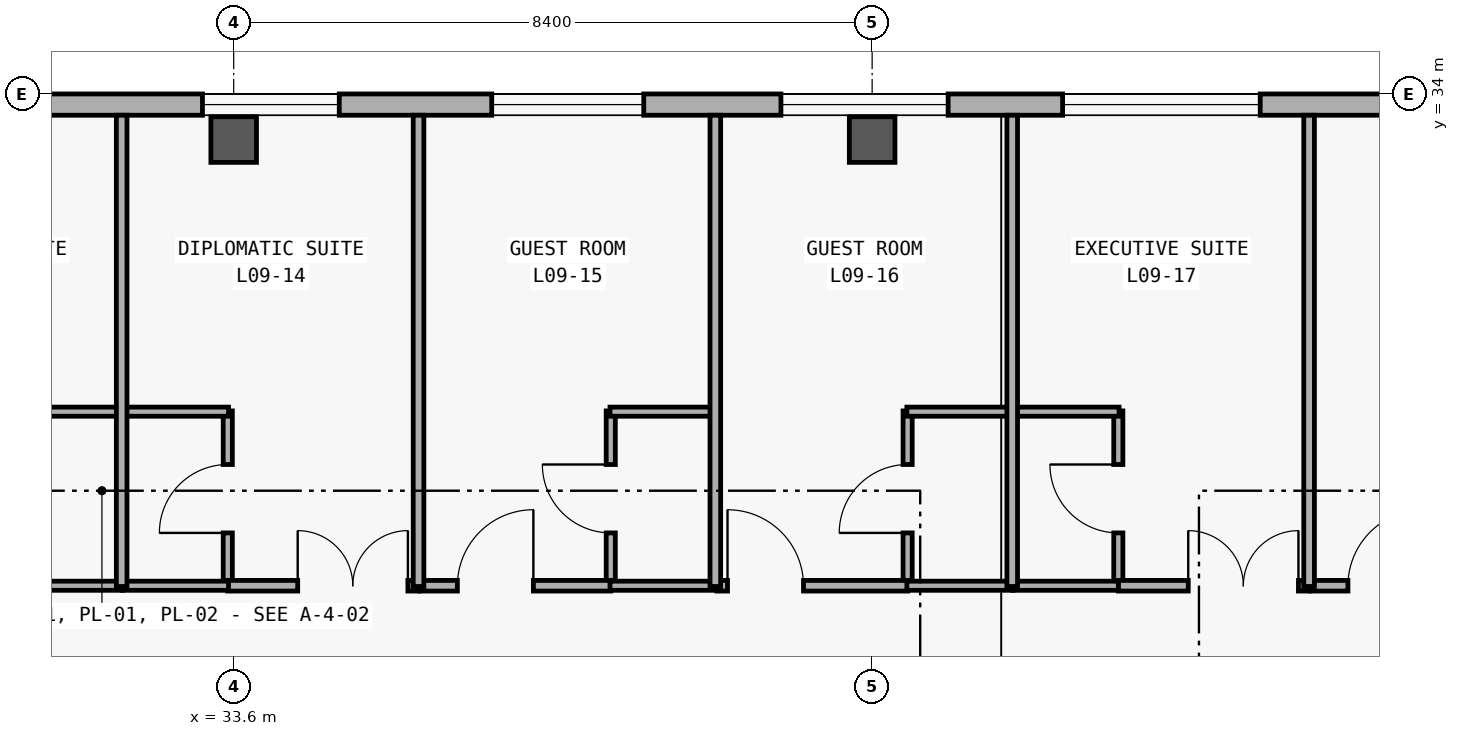
"""IFC4 building model, lengths in metres.
Left out: names, types, materials, properties, quantities, classifications, styles, units other than length and angle.
Written with IfcOpenShell. Run it as: python <this file> out.ifc"""

import sys

from ifc_helpers import new_model, si_unit, direction, frame, frame_2d, origin, origin_2d, place, context, subcontext, project, spatial, rectangle, extrude, element, fill, save


model = new_model("IFC4")
c1 = context("Model", 3, precision=1e-05, world=origin(), true_north=direction((0.0, 1.0)))
c2 = subcontext(c1, "Body", "Model", "MODEL_VIEW")
j1 = project(units=[si_unit("LENGTHUNIT", "METRE"), si_unit("PLANEANGLEUNIT", "RADIAN")], contexts=[c1])
p1 = place(None, origin())
s1 = spatial("IfcSite", under=j1, at=p1, CompositionType="ELEMENT")
p2 = place(p1, origin())
s2 = spatial("IfcBuilding", under=s1, at=p2, CompositionType="ELEMENT")
p3 = place(p2, frame((0.0, 0.0, 37.2)))
s3 = spatial("IfcBuildingStorey", under=s2, at=p3, CompositionType="ELEMENT", Elevation=37.2)
for number, where, z_axis, x_axis in (
    (1, (33.6, 33.4, 0.0), (0.0, 0.0, 1.0), (1.0, 0.0, 0.0)),
    (2, (42.0, 33.4, 0.0), (0.0, 0.0, 1.0), (1.0, 0.0, 0.0)),
):
    element("IfcColumn", number, at=place(p3, frame(where, z_axis=z_axis, x_axis=x_axis)), inside=s3, PredefinedType="COLUMN", context=c2, shape_type="SweptSolid", body=[
        extrude(rectangle(XDim=0.6, YDim=0.6, at=origin_2d()), origin(), (0.0, 0.0, 1.0), 3.6),
    ])
p4 = place(p3, frame((17.08, 33.86, 0.0), z_axis=(0.0, 0.0, 1.0), x_axis=(1.0, 0.0, 0.0)))
e3 = element("IfcWall", 3, at=p4, inside=s3, PredefinedType="SOLIDWALL", context=c2, shape_type="SweptSolid", body=[
    extrude(rectangle(XDim=58.24, YDim=0.28, at=frame_2d((29.12, 0.0))), origin(), (0.0, 0.0, 1.0), 3.34),
])
p5 = place(p4, frame((4.87, 0.0, 0.85)))
e4 = element("IfcOpeningElement", 4, at=p5, cuts=e3, PredefinedType="OPENING", context=c2, shape_type="SweptSolid", body=[
    extrude(rectangle(XDim=1.55, YDim=1.65, at=frame_2d((0.775, 0.825))), frame((0.0, 0.15, 0.0), z_axis=(0.0, -1.0, 0.0), x_axis=(1.0, 0.0, 0.0)), (0.0, 0.0, 1.0), 0.3),
])
p6 = place(p4, frame((12.303, 0.0, 0.85)))
e5 = element("IfcOpeningElement", 5, at=p6, cuts=e3, PredefinedType="OPENING", context=c2, shape_type="SweptSolid", body=[
    extrude(rectangle(XDim=1.6, YDim=1.6, at=frame_2d((0.8, 0.8))), frame((0.0, 0.15, 0.0), z_axis=(0.0, -1.0, 0.0), x_axis=(1.0, 0.0, 0.0)), (0.0, 0.0, 1.0), 0.3),
])
p7 = place(p4, frame((16.109, 0.0, 0.85)))
e6 = element("IfcOpeningElement", 6, at=p7, cuts=e3, PredefinedType="OPENING", context=c2, shape_type="SweptSolid", body=[
    extrude(rectangle(XDim=1.8, YDim=1.6, at=frame_2d((0.9, 0.8))), frame((0.0, 0.15, 0.0), z_axis=(0.0, -1.0, 0.0), x_axis=(1.0, 0.0, 0.0)), (0.0, 0.0, 1.0), 0.3),
])
p8 = place(p4, frame((19.915, 0.0, 0.85)))
e7 = element("IfcOpeningElement", 7, at=p8, cuts=e3, PredefinedType="OPENING", context=c2, shape_type="SweptSolid", body=[
    extrude(rectangle(XDim=2.0, YDim=1.65, at=frame_2d((1.0, 0.825))), frame((0.0, 0.15, 0.0), z_axis=(0.0, -1.0, 0.0), x_axis=(1.0, 0.0, 0.0)), (0.0, 0.0, 1.0), 0.3),
])
p9 = place(p4, frame((23.72, 0.0, 0.85)))
e8 = element("IfcOpeningElement", 8, at=p9, cuts=e3, PredefinedType="OPENING", context=c2, shape_type="SweptSolid", body=[
    extrude(rectangle(XDim=2.2, YDim=1.65, at=frame_2d((1.1, 0.825))), frame((0.0, 0.15, 0.0), z_axis=(0.0, -1.0, 0.0), x_axis=(1.0, 0.0, 0.0)), (0.0, 0.0, 1.0), 0.3),
])
p10 = place(p4, frame((27.426, 0.0, 0.85)))
e9 = element("IfcOpeningElement", 9, at=p10, cuts=e3, PredefinedType="OPENING", context=c2, shape_type="SweptSolid", body=[
    extrude(rectangle(XDim=2.6, YDim=2.2, at=frame_2d((1.3, 1.1))), frame((0.0, 0.15, 0.0), z_axis=(0.0, -1.0, 0.0), x_axis=(1.0, 0.0, 0.0)), (0.0, 0.0, 1.0), 0.3),
])
p11 = place(p4, frame((32.007, 0.0, 0.85)))
e10 = element("IfcOpeningElement", 10, at=p11, cuts=e3, PredefinedType="OPENING", context=c2, shape_type="SweptSolid", body=[
    extrude(rectangle(XDim=1.25, YDim=1.45, at=frame_2d((0.625, 0.725))), frame((0.0, 0.15, 0.0), z_axis=(0.0, -1.0, 0.0), x_axis=(1.0, 0.0, 0.0)), (0.0, 0.0, 1.0), 0.3),
])
p12 = place(p4, frame((35.863, 0.0, 0.85)))
e11 = element("IfcOpeningElement", 11, at=p12, cuts=e3, PredefinedType="OPENING", context=c2, shape_type="SweptSolid", body=[
    extrude(rectangle(XDim=1.35, YDim=1.55, at=frame_2d((0.675, 0.775))), frame((0.0, 0.15, 0.0), z_axis=(0.0, -1.0, 0.0), x_axis=(1.0, 0.0, 0.0)), (0.0, 0.0, 1.0), 0.3),
])
p13 = place(p4, frame((39.719, 0.0, 0.85)))
e12 = element("IfcOpeningElement", 12, at=p13, cuts=e3, PredefinedType="OPENING", context=c2, shape_type="SweptSolid", body=[
    extrude(rectangle(XDim=1.45, YDim=1.65, at=frame_2d((0.725, 0.825))), frame((0.0, 0.15, 0.0), z_axis=(0.0, -1.0, 0.0), x_axis=(1.0, 0.0, 0.0)), (0.0, 0.0, 1.0), 0.3),
])
p14 = place(p4, frame((43.575, 0.0, 0.85)))
e13 = element("IfcOpeningElement", 13, at=p14, cuts=e3, PredefinedType="OPENING", context=c2, shape_type="SweptSolid", body=[
    extrude(rectangle(XDim=1.55, YDim=1.65, at=frame_2d((0.775, 0.825))), frame((0.0, 0.15, 0.0), z_axis=(0.0, -1.0, 0.0), x_axis=(1.0, 0.0, 0.0)), (0.0, 0.0, 1.0), 0.3),
])
p15 = place(p4, frame((47.405, 0.0, 0.85)))
e14 = element("IfcOpeningElement", 14, at=p15, cuts=e3, PredefinedType="OPENING", context=c2, shape_type="SweptSolid", body=[
    extrude(rectangle(XDim=1.7, YDim=2.0, at=frame_2d((0.85, 1.0))), frame((0.0, 0.15, 0.0), z_axis=(0.0, -1.0, 0.0), x_axis=(1.0, 0.0, 0.0)), (0.0, 0.0, 1.0), 0.3),
])
p16 = place(p4, frame((51.011, 0.0, 0.85)))
e15 = element("IfcOpeningElement", 15, at=p16, cuts=e3, PredefinedType="OPENING", context=c2, shape_type="SweptSolid", body=[
    extrude(rectangle(XDim=2.3, YDim=2.05, at=frame_2d((1.15, 1.025))), frame((0.0, 0.15, 0.0), z_axis=(0.0, -1.0, 0.0), x_axis=(1.0, 0.0, 0.0)), (0.0, 0.0, 1.0), 0.3),
])
p17 = place(p4, frame((54.692, 0.0, 0.85)))
e16 = element("IfcOpeningElement", 16, at=p17, cuts=e3, PredefinedType="OPENING", context=c2, shape_type="SweptSolid", body=[
    extrude(rectangle(XDim=2.75, YDim=2.1, at=frame_2d((1.375, 1.05))), frame((0.0, 0.15, 0.0), z_axis=(0.0, -1.0, 0.0), x_axis=(1.0, 0.0, 0.0)), (0.0, 0.0, 1.0), 0.3),
])
p18 = place(p3, frame((33.522, 27.52, 0.0), z_axis=(0.0, 0.0, 1.0), x_axis=(0.0, 1.0, 0.0)))
e17 = element("IfcWall", 17, at=p18, inside=s3, PredefinedType="PARTITIONING", context=c2, shape_type="SweptSolid", body=[
    extrude(rectangle(XDim=2.31, YDim=0.12, at=frame_2d((1.155, 0.0))), origin(), (0.0, 0.0, 1.0), 2.48),
])
p19 = place(p18, frame((0.705, 0.0, 0.0)))
e18 = element("IfcOpeningElement", 18, at=p19, cuts=e17, PredefinedType="OPENING", context=c2, shape_type="SweptSolid", body=[
    extrude(rectangle(XDim=0.9, YDim=2.18, at=frame_2d((0.45, 1.09))), frame((0.0, 0.07, 0.0), z_axis=(0.0, -1.0, 0.0), x_axis=(1.0, 0.0, 0.0)), (0.0, 0.0, 1.0), 0.14),
])
p20 = place(p3, frame((38.561, 27.52, 0.0), z_axis=(0.0, 0.0, 1.0), x_axis=(0.0, 1.0, 0.0)))
e19 = element("IfcWall", 19, at=p20, inside=s3, PredefinedType="PARTITIONING", context=c2, shape_type="SweptSolid", body=[
    extrude(rectangle(XDim=2.31, YDim=0.12, at=frame_2d((1.155, 0.0))), origin(), (0.0, 0.0, 1.0), 2.48),
])
p21 = place(p20, frame((0.705, 0.0, 0.0)))
e20 = element("IfcOpeningElement", 20, at=p21, cuts=e19, PredefinedType="OPENING", context=c2, shape_type="SweptSolid", body=[
    extrude(rectangle(XDim=0.9, YDim=2.18, at=frame_2d((0.45, 1.09))), frame((0.0, 0.07, 0.0), z_axis=(0.0, -1.0, 0.0), x_axis=(1.0, 0.0, 0.0)), (0.0, 0.0, 1.0), 0.14),
])
p22 = place(p3, frame((42.467, 27.52, 0.0), z_axis=(0.0, 0.0, 1.0), x_axis=(0.0, 1.0, 0.0)))
e21 = element("IfcWall", 21, at=p22, inside=s3, PredefinedType="PARTITIONING", context=c2, shape_type="SweptSolid", body=[
    extrude(rectangle(XDim=2.31, YDim=0.12, at=frame_2d((1.155, 0.0))), origin(), (0.0, 0.0, 1.0), 2.48),
])
p23 = place(p22, frame((0.705, 0.0, 0.0)))
e22 = element("IfcOpeningElement", 22, at=p23, cuts=e21, PredefinedType="OPENING", context=c2, shape_type="SweptSolid", body=[
    extrude(rectangle(XDim=0.9, YDim=2.18, at=frame_2d((0.45, 1.09))), frame((0.0, 0.07, 0.0), z_axis=(0.0, -1.0, 0.0), x_axis=(1.0, 0.0, 0.0)), (0.0, 0.0, 1.0), 0.14),
])
p24 = place(p3, frame((45.239, 27.52, 0.0), z_axis=(0.0, 0.0, 1.0), x_axis=(0.0, 1.0, 0.0)))
e23 = element("IfcWall", 23, at=p24, inside=s3, PredefinedType="PARTITIONING", context=c2, shape_type="SweptSolid", body=[
    extrude(rectangle(XDim=2.31, YDim=0.12, at=frame_2d((1.155, 0.0))), origin(), (0.0, 0.0, 1.0), 2.48),
])
p25 = place(p24, frame((0.705, 0.0, 0.0)))
e24 = element("IfcOpeningElement", 24, at=p25, cuts=e23, PredefinedType="OPENING", context=c2, shape_type="SweptSolid", body=[
    extrude(rectangle(XDim=0.9, YDim=2.18, at=frame_2d((0.45, 1.09))), frame((0.0, 0.07, 0.0), z_axis=(0.0, -1.0, 0.0), x_axis=(1.0, 0.0, 0.0)), (0.0, 0.0, 1.0), 0.14),
])
p26 = place(p3, frame((33.522, 27.53, 0.0), z_axis=(0.0, 0.0, 1.0), x_axis=(1.0, 0.0, 0.0)))
e25 = element("IfcWall", 25, at=p26, inside=s3, PredefinedType="PARTITIONING", context=c2, shape_type="SweptSolid", body=[
    extrude(rectangle(XDim=2.51, YDim=0.14, at=frame_2d((1.255, 0.0))), origin(), (0.0, 0.0, 1.0), 2.48),
])
p27 = place(p26, frame((0.92, 0.0, 0.0)))
e26 = element("IfcOpeningElement", 26, at=p27, cuts=e25, PredefinedType="OPENING", context=c2, shape_type="SweptSolid", body=[
    extrude(rectangle(XDim=1.45, YDim=2.3, at=frame_2d((0.725, 1.15))), frame((0.0, 0.08, 0.0), z_axis=(0.0, -1.0, 0.0), x_axis=(1.0, 0.0, 0.0)), (0.0, 0.0, 1.0), 0.16),
])
p28 = place(p3, frame((36.052, 27.53, 0.0), z_axis=(0.0, 0.0, 1.0), x_axis=(1.0, 0.0, 0.0)))
e27 = element("IfcWall", 27, at=p28, inside=s3, PredefinedType="PARTITIONING", context=c2, shape_type="SweptSolid", body=[
    extrude(rectangle(XDim=2.509, YDim=0.14, at=frame_2d((1.254, 0.0))), origin(), (0.0, 0.0, 1.0), 2.48),
])
p29 = place(p28, frame((0.491, 0.0, 0.0)))
e28 = element("IfcOpeningElement", 28, at=p29, cuts=e27, PredefinedType="OPENING", context=c2, shape_type="SweptSolid", body=[
    extrude(rectangle(XDim=1.0, YDim=2.28, at=frame_2d((0.5, 1.14))), frame((0.0, 0.08, 0.0), z_axis=(0.0, -1.0, 0.0), x_axis=(1.0, 0.0, 0.0)), (0.0, 0.0, 1.0), 0.16),
])
p30 = place(p3, frame((39.957, 27.53, 0.0), z_axis=(0.0, 0.0, 1.0), x_axis=(1.0, 0.0, 0.0)))
e29 = element("IfcWall", 29, at=p30, inside=s3, PredefinedType="PARTITIONING", context=c2, shape_type="SweptSolid", body=[
    extrude(rectangle(XDim=2.51, YDim=0.14, at=frame_2d((1.255, 0.0))), origin(), (0.0, 0.0, 1.0), 2.48),
])
p31 = place(p30, frame((0.14, 0.0, 0.0)))
e30 = element("IfcOpeningElement", 30, at=p31, cuts=e29, PredefinedType="OPENING", context=c2, shape_type="SweptSolid", body=[
    extrude(rectangle(XDim=1.0, YDim=2.28, at=frame_2d((0.5, 1.14))), frame((0.0, 0.08, 0.0), z_axis=(0.0, -1.0, 0.0), x_axis=(1.0, 0.0, 0.0)), (0.0, 0.0, 1.0), 0.16),
])
p32 = place(p3, frame((45.239, 27.53, 0.0), z_axis=(0.0, 0.0, 1.0), x_axis=(1.0, 0.0, 0.0)))
e31 = element("IfcWall", 31, at=p32, inside=s3, PredefinedType="PARTITIONING", context=c2, shape_type="SweptSolid", body=[
    extrude(rectangle(XDim=2.51, YDim=0.14, at=frame_2d((1.255, 0.0))), origin(), (0.0, 0.0, 1.0), 2.48),
])
p33 = place(p32, frame((0.92, 0.0, 0.0)))
e32 = element("IfcOpeningElement", 32, at=p33, cuts=e31, PredefinedType="OPENING", context=c2, shape_type="SweptSolid", body=[
    extrude(rectangle(XDim=1.45, YDim=2.3, at=frame_2d((0.725, 1.15))), frame((0.0, 0.08, 0.0), z_axis=(0.0, -1.0, 0.0), x_axis=(1.0, 0.0, 0.0)), (0.0, 0.0, 1.0), 0.16),
])
p34 = place(p3, frame((47.769, 27.53, 0.0), z_axis=(0.0, 0.0, 1.0), x_axis=(1.0, 0.0, 0.0)))
e33 = element("IfcWall", 33, at=p34, inside=s3, PredefinedType="PARTITIONING", context=c2, shape_type="SweptSolid", body=[
    extrude(rectangle(XDim=2.51, YDim=0.14, at=frame_2d((1.255, 0.0))), origin(), (0.0, 0.0, 1.0), 2.48),
])
p35 = place(p34, frame((0.491, 0.0, 0.0)))
e34 = element("IfcOpeningElement", 34, at=p35, cuts=e33, PredefinedType="OPENING", context=c2, shape_type="SweptSolid", body=[
    extrude(rectangle(XDim=1.0, YDim=2.28, at=frame_2d((0.5, 1.14))), frame((0.0, 0.08, 0.0), z_axis=(0.0, -1.0, 0.0), x_axis=(1.0, 0.0, 0.0)), (0.0, 0.0, 1.0), 0.16),
])
for number, where, z_axis, x_axis in (
    (35, (30.74, 27.53, 0.0), (0.0, 0.0, 1.0), (1.0, 0.0, 0.0)),
    (36, (30.74, 29.82, 0.0), (0.0, 0.0, 1.0), (1.0, 0.0, 0.0)),
    (37, (32.136, 27.53, 0.0), (0.0, 0.0, 1.0), (1.0, 0.0, 0.0)),
    (38, (32.136, 29.82, 0.0), (0.0, 0.0, 1.0), (1.0, 0.0, 0.0)),
    (39, (38.551, 27.53, 0.0), (0.0, 0.0, 1.0), (1.0, 0.0, 0.0)),
    (40, (38.551, 29.82, 0.0), (0.0, 0.0, 1.0), (1.0, 0.0, 0.0)),
    (41, (42.457, 27.53, 0.0), (0.0, 0.0, 1.0), (1.0, 0.0, 0.0)),
    (42, (42.457, 29.82, 0.0), (0.0, 0.0, 1.0), (1.0, 0.0, 0.0)),
):
    element("IfcWall", number, at=place(p3, frame(where, z_axis=z_axis, x_axis=x_axis)), inside=s3, PredefinedType="PARTITIONING", context=c2, shape_type="SweptSolid", body=[
        extrude(rectangle(XDim=1.396, YDim=0.12, at=frame_2d((0.698, 0.0))), origin(), (0.0, 0.0, 1.0), 2.48),
    ])
p36 = place(p3, frame((43.853, 27.53, 0.0), z_axis=(0.0, 0.0, 1.0), x_axis=(1.0, 0.0, 0.0)))
e43 = element("IfcWall", 43, at=p36, inside=s3, PredefinedType="PARTITIONING", context=c2, shape_type="SweptSolid", body=[
    extrude(rectangle(XDim=1.386, YDim=0.12, at=frame_2d((0.693, 0.0))), origin(), (0.0, 0.0, 1.0), 2.48),
])
p37 = place(p3, frame((43.853, 29.82, 0.0), z_axis=(0.0, 0.0, 1.0), x_axis=(1.0, 0.0, 0.0)))
e44 = element("IfcWall", 44, at=p37, inside=s3, PredefinedType="PARTITIONING", context=c2, shape_type="SweptSolid", body=[
    extrude(rectangle(XDim=1.396, YDim=0.12, at=frame_2d((0.698, 0.0))), origin(), (0.0, 0.0, 1.0), 2.48),
])
for number, where, z_axis, x_axis in (
    (45, (32.126, 27.52, 0.0), (0.0, 0.0, 1.0), (0.0, 1.0, 0.0)),
    (46, (36.032, 27.52, 0.0), (0.0, 0.0, 1.0), (0.0, 1.0, 0.0)),
    (47, (39.937, 27.52, 0.0), (0.0, 0.0, 1.0), (0.0, 1.0, 0.0)),
    (48, (43.843, 27.52, 0.0), (0.0, 0.0, 1.0), (0.0, 1.0, 0.0)),
    (49, (47.749, 27.52, 0.0), (0.0, 0.0, 1.0), (0.0, 1.0, 0.0)),
):
    element("IfcWall", number, at=place(p3, frame(where, z_axis=z_axis, x_axis=x_axis)), inside=s3, PredefinedType="PARTITIONING", context=c2, shape_type="SweptSolid", body=[
        extrude(rectangle(XDim=6.2, YDim=0.14, at=frame_2d((3.1, 0.0))), origin(), (0.0, 0.0, 1.0), 2.48),
    ])
p38 = place(p7, origin())
e50 = element("IfcWindow", 50, at=p38, inside=s3, PartitioningType="SINGLE_PANEL", PredefinedType="WINDOW", context=c2, shape_type="SweptSolid", body=[
    extrude(rectangle(XDim=1.8, YDim=1.6, at=frame_2d((0.9, 0.8))), frame((0.0, 0.03, 0.0), z_axis=(0.0, -1.0, 0.0), x_axis=(1.0, 0.0, 0.0)), (0.0, 0.0, 1.0), 0.06),
])
fill(e6, e50)
p39 = place(p8, origin())
e51 = element("IfcWindow", 51, at=p39, inside=s3, PartitioningType="SINGLE_PANEL", PredefinedType="WINDOW", context=c2, shape_type="SweptSolid", body=[
    extrude(rectangle(XDim=2.0, YDim=1.65, at=frame_2d((1.0, 0.825))), frame((0.0, 0.03, 0.0), z_axis=(0.0, -1.0, 0.0), x_axis=(1.0, 0.0, 0.0)), (0.0, 0.0, 1.0), 0.06),
])
fill(e7, e51)
p40 = place(p9, origin())
e52 = element("IfcWindow", 52, at=p40, inside=s3, PartitioningType="SINGLE_PANEL", PredefinedType="WINDOW", context=c2, shape_type="SweptSolid", body=[
    extrude(rectangle(XDim=2.2, YDim=1.65, at=frame_2d((1.1, 0.825))), frame((0.0, 0.03, 0.0), z_axis=(0.0, -1.0, 0.0), x_axis=(1.0, 0.0, 0.0)), (0.0, 0.0, 1.0), 0.06),
])
fill(e8, e52)
p41 = place(p10, origin())
e53 = element("IfcWindow", 53, at=p41, inside=s3, PartitioningType="SINGLE_PANEL", PredefinedType="WINDOW", context=c2, shape_type="SweptSolid", body=[
    extrude(rectangle(XDim=2.6, YDim=2.2, at=frame_2d((1.3, 1.1))), frame((0.0, 0.03, 0.0), z_axis=(0.0, -1.0, 0.0), x_axis=(1.0, 0.0, 0.0)), (0.0, 0.0, 1.0), 0.06),
])
fill(e9, e53)
p42 = place(p19, origin())
e54 = element("IfcDoor", 54, at=p42, inside=s3, OperationType="SINGLE_SWING_LEFT", PredefinedType="DOOR", context=c2, shape_type="SweptSolid", body=[
    extrude(rectangle(XDim=0.9, YDim=2.18, at=frame_2d((0.45, 1.09))), frame((0.0, 0.025, 0.0), z_axis=(0.0, -1.0, 0.0), x_axis=(1.0, 0.0, 0.0)), (0.0, 0.0, 1.0), 0.05),
])
fill(e18, e54)
p43 = place(p21, origin())
e55 = element("IfcDoor", 55, at=p43, inside=s3, OperationType="SINGLE_SWING_RIGHT", PredefinedType="DOOR", context=c2, shape_type="SweptSolid", body=[
    extrude(rectangle(XDim=0.9, YDim=2.18, at=frame_2d((0.45, 1.09))), frame((0.0, 0.025, 0.0), z_axis=(0.0, -1.0, 0.0), x_axis=(1.0, 0.0, 0.0)), (0.0, 0.0, 1.0), 0.05),
])
fill(e20, e55)
p44 = place(p23, origin())
e56 = element("IfcDoor", 56, at=p44, inside=s3, OperationType="SINGLE_SWING_LEFT", PredefinedType="DOOR", context=c2, shape_type="SweptSolid", body=[
    extrude(rectangle(XDim=0.9, YDim=2.18, at=frame_2d((0.45, 1.09))), frame((0.0, 0.025, 0.0), z_axis=(0.0, -1.0, 0.0), x_axis=(1.0, 0.0, 0.0)), (0.0, 0.0, 1.0), 0.05),
])
fill(e22, e56)
p45 = place(p25, origin())
e57 = element("IfcDoor", 57, at=p45, inside=s3, OperationType="SINGLE_SWING_RIGHT", PredefinedType="DOOR", context=c2, shape_type="SweptSolid", body=[
    extrude(rectangle(XDim=0.9, YDim=2.18, at=frame_2d((0.45, 1.09))), frame((0.0, 0.025, 0.0), z_axis=(0.0, -1.0, 0.0), x_axis=(1.0, 0.0, 0.0)), (0.0, 0.0, 1.0), 0.05),
])
fill(e24, e57)
p46 = place(p27, origin())
e58 = element("IfcDoor", 58, at=p46, inside=s3, OperationType="DOUBLE_DOOR_SINGLE_SWING", PredefinedType="DOOR", context=c2, shape_type="SweptSolid", body=[
    extrude(rectangle(XDim=1.45, YDim=2.3, at=frame_2d((0.725, 1.15))), frame((0.0, 0.025, 0.0), z_axis=(0.0, -1.0, 0.0), x_axis=(1.0, 0.0, 0.0)), (0.0, 0.0, 1.0), 0.05),
])
fill(e26, e58)
p47 = place(p29, origin())
e59 = element("IfcDoor", 59, at=p47, inside=s3, OperationType="SINGLE_SWING_RIGHT", PredefinedType="DOOR", context=c2, shape_type="SweptSolid", body=[
    extrude(rectangle(XDim=1.0, YDim=2.28, at=frame_2d((0.5, 1.14))), frame((0.0, 0.025, 0.0), z_axis=(0.0, -1.0, 0.0), x_axis=(1.0, 0.0, 0.0)), (0.0, 0.0, 1.0), 0.05),
])
fill(e28, e59)
p48 = place(p31, origin())
e60 = element("IfcDoor", 60, at=p48, inside=s3, OperationType="SINGLE_SWING_LEFT", PredefinedType="DOOR", context=c2, shape_type="SweptSolid", body=[
    extrude(rectangle(XDim=1.0, YDim=2.28, at=frame_2d((0.5, 1.14))), frame((0.0, 0.025, 0.0), z_axis=(0.0, -1.0, 0.0), x_axis=(1.0, 0.0, 0.0)), (0.0, 0.0, 1.0), 0.05),
])
fill(e30, e60)
p49 = place(p33, origin())
e61 = element("IfcDoor", 61, at=p49, inside=s3, OperationType="DOUBLE_DOOR_SINGLE_SWING", PredefinedType="DOOR", context=c2, shape_type="SweptSolid", body=[
    extrude(rectangle(XDim=1.45, YDim=2.3, at=frame_2d((0.725, 1.15))), frame((0.0, 0.025, 0.0), z_axis=(0.0, -1.0, 0.0), x_axis=(1.0, 0.0, 0.0)), (0.0, 0.0, 1.0), 0.05),
])
fill(e32, e61)
p50 = place(p35, origin())
e62 = element("IfcDoor", 62, at=p50, inside=s3, OperationType="SINGLE_SWING_RIGHT", PredefinedType="DOOR", context=c2, shape_type="SweptSolid", body=[
    extrude(rectangle(XDim=1.0, YDim=2.28, at=frame_2d((0.5, 1.14))), frame((0.0, 0.025, 0.0), z_axis=(0.0, -1.0, 0.0), x_axis=(1.0, 0.0, 0.0)), (0.0, 0.0, 1.0), 0.05),
])
fill(e34, e62)
save(model, sys.argv[1])
